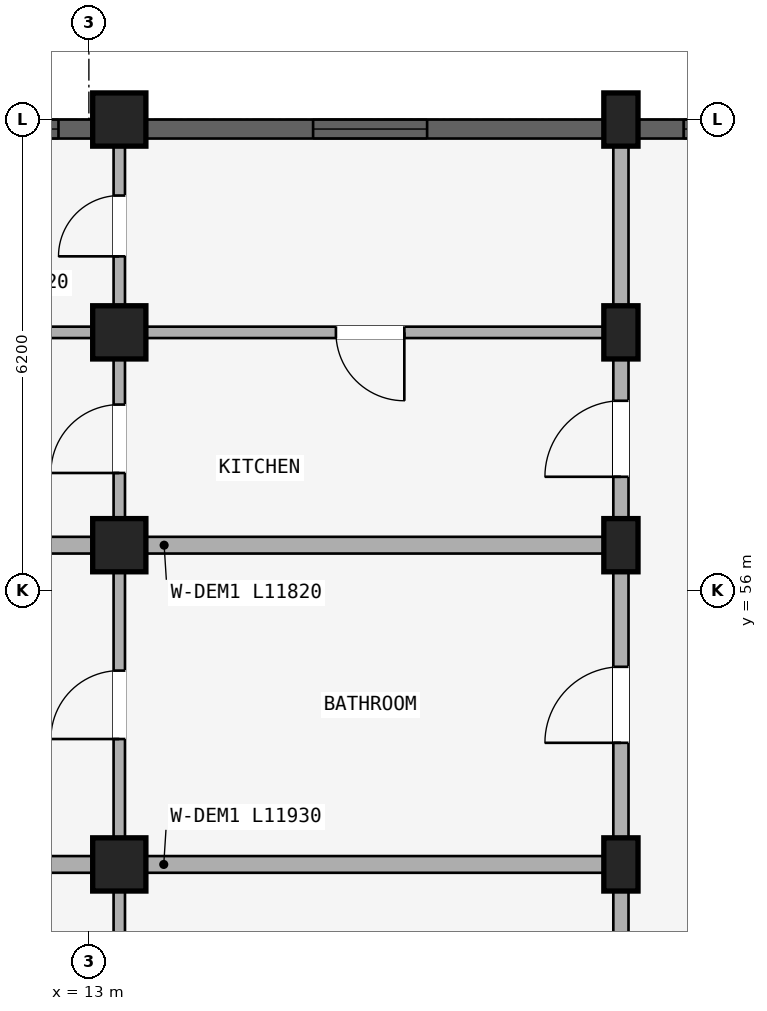
"""IFC4 building model, lengths in metres.
Left out: names, types, materials, properties, quantities, classifications, styles, units other than length and angle.
Written with IfcOpenShell. Run it as: python <this file> out.ifc"""

import sys

from ifc_helpers import new_model, si_unit, direction, frame, frame_2d, origin, origin_2d, place, context, subcontext, project, spatial, rectangle, extrude, element, fill, save


model = new_model("IFC4")
c1 = context("Model", 3, precision=1e-05, world=origin(), true_north=direction((0.0, 1.0)))
c2 = subcontext(c1, "Body", "Model", "MODEL_VIEW")
j1 = project(units=[si_unit("LENGTHUNIT", "METRE"), si_unit("PLANEANGLEUNIT", "RADIAN")], contexts=[c1])
p1 = place(None, origin())
s1 = spatial("IfcSite", under=j1, at=p1, CompositionType="ELEMENT")
p2 = place(p1, origin())
s2 = spatial("IfcBuilding", under=s1, at=p2, CompositionType="ELEMENT")
p3 = place(p2, frame((0.0, 0.0, 24.45)))
s3 = spatial("IfcBuildingStorey", under=s2, at=p3, CompositionType="ELEMENT", Elevation=24.45)
p4 = place(p3, frame((20.0, 52.4, 0.0), z_axis=(0.0, 0.0, 1.0), x_axis=(1.0, 0.0, 0.0)))
e1 = element("IfcColumn", 1, at=p4, inside=s3, PredefinedType="COLUMN", context=c2, shape_type="SweptSolid", body=[
    extrude(rectangle(XDim=0.45, YDim=0.7, at=origin_2d()), origin(), (0.0, 0.0, 1.0), 2.93),
])
p5 = place(p3, frame((13.4, 52.4, 0.0), z_axis=(0.0, 0.0, 1.0), x_axis=(1.0, 0.0, 0.0)))
e2 = element("IfcColumn", 2, at=p5, inside=s3, PredefinedType="COLUMN", context=c2, shape_type="SweptSolid", body=[
    extrude(rectangle(XDim=0.7, YDim=0.7, at=origin_2d()), origin(), (0.0, 0.0, 1.0), 2.93),
])
p6 = place(p3, frame((20.0, 56.6, 0.0), z_axis=(0.0, 0.0, 1.0), x_axis=(1.0, 0.0, 0.0)))
e3 = element("IfcColumn", 3, at=p6, inside=s3, PredefinedType="COLUMN", context=c2, shape_type="SweptSolid", body=[
    extrude(rectangle(XDim=0.45, YDim=0.7, at=origin_2d()), origin(), (0.0, 0.0, 1.0), 2.93),
])
p7 = place(p3, frame((13.4, 56.6, 0.0), z_axis=(0.0, 0.0, 1.0), x_axis=(1.0, 0.0, 0.0)))
e4 = element("IfcColumn", 4, at=p7, inside=s3, PredefinedType="COLUMN", context=c2, shape_type="SweptSolid", body=[
    extrude(rectangle(XDim=0.7, YDim=0.7, at=origin_2d()), origin(), (0.0, 0.0, 1.0), 2.93),
])
p8 = place(p3, frame((20.0, 59.4, 0.0), z_axis=(0.0, 0.0, 1.0), x_axis=(1.0, 0.0, 0.0)))
e5 = element("IfcColumn", 5, at=p8, inside=s3, PredefinedType="COLUMN", context=c2, shape_type="SweptSolid", body=[
    extrude(rectangle(XDim=0.45, YDim=0.7, at=origin_2d()), origin(), (0.0, 0.0, 1.0), 2.93),
])
p9 = place(p3, frame((13.4, 59.4, 0.0), z_axis=(0.0, 0.0, 1.0), x_axis=(1.0, 0.0, 0.0)))
e6 = element("IfcColumn", 6, at=p9, inside=s3, PredefinedType="COLUMN", context=c2, shape_type="SweptSolid", body=[
    extrude(rectangle(XDim=0.7, YDim=0.7, at=origin_2d()), origin(), (0.0, 0.0, 1.0), 2.93),
])
p10 = place(p3, frame((20.0, 62.2, 0.0), z_axis=(0.0, 0.0, 1.0), x_axis=(1.0, 0.0, 0.0)))
e7 = element("IfcColumn", 7, at=p10, inside=s3, PredefinedType="COLUMN", context=c2, shape_type="SweptSolid", body=[
    extrude(rectangle(XDim=0.45, YDim=0.7, at=origin_2d()), origin(), (0.0, 0.0, 1.0), 2.93),
])
p11 = place(p3, frame((13.4, 62.2, 0.0), z_axis=(0.0, 0.0, 1.0), x_axis=(1.0, 0.0, 0.0)))
e8 = element("IfcColumn", 8, at=p11, inside=s3, PredefinedType="COLUMN", context=c2, shape_type="SweptSolid", body=[
    extrude(rectangle(XDim=0.7, YDim=0.7, at=origin_2d()), origin(), (0.0, 0.0, 1.0), 2.93),
])
p12 = place(p3, frame((20.0, 48.35, 0.0), z_axis=(0.0, 0.0, 1.0), x_axis=(0.0, 1.0, 0.0)))
e9 = element("IfcWall", 9, at=p12, inside=s3, PredefinedType="STANDARD", context=c2, shape_type="SweptSolid", body=[
    extrude(rectangle(XDim=4.05, YDim=0.2, at=frame_2d((2.025, 0.0))), origin(), (0.0, 0.0, 1.0), 2.372),
])
p13 = place(p12, frame((1.525, 0.0, 0.0)))
e10 = element("IfcOpeningElement", 10, at=p13, cuts=e9, PredefinedType="OPENING", context=c2, shape_type="SweptSolid", body=[
    extrude(rectangle(XDim=1.0, YDim=2.15, at=frame_2d((0.5, 1.075))), frame((0.0, 0.11, 0.0), z_axis=(0.0, -1.0, 0.0), x_axis=(1.0, 0.0, 0.0)), (0.0, 0.0, 1.0), 0.22),
])
p14 = place(p3, frame((13.4, 48.43, 0.0), z_axis=(0.0, 0.0, 1.0), x_axis=(0.0, 1.0, 0.0)))
e11 = element("IfcWall", 11, at=p14, inside=s3, PredefinedType="PARTITIONING", context=c2, shape_type="SweptSolid", body=[
    extrude(rectangle(XDim=3.89, YDim=0.15, at=frame_2d((1.945, 0.0))), origin(), (0.0, 0.0, 1.0), 2.372),
])
p15 = place(p14, frame((1.495, 0.0, 0.0)))
e12 = element("IfcOpeningElement", 12, at=p15, cuts=e11, PredefinedType="OPENING", context=c2, shape_type="SweptSolid", body=[
    extrude(rectangle(XDim=0.9, YDim=2.1, at=frame_2d((0.45, 1.05))), frame((0.0, 0.085, 0.0), z_axis=(0.0, -1.0, 0.0), x_axis=(1.0, 0.0, 0.0)), (0.0, 0.0, 1.0), 0.17),
])
p16 = place(p3, frame((20.0, 52.4, 0.0), z_axis=(0.0, 0.0, 1.0), x_axis=(0.0, 1.0, 0.0)))
e13 = element("IfcWall", 13, at=p16, inside=s3, PredefinedType="STANDARD", context=c2, shape_type="SweptSolid", body=[
    extrude(rectangle(XDim=4.2, YDim=0.2, at=frame_2d((2.1, 0.0))), origin(), (0.0, 0.0, 1.0), 2.372),
])
p17 = place(p16, frame((1.6, 0.0, 0.0)))
e14 = element("IfcOpeningElement", 14, at=p17, cuts=e13, PredefinedType="OPENING", context=c2, shape_type="SweptSolid", body=[
    extrude(rectangle(XDim=1.0, YDim=2.15, at=frame_2d((0.5, 1.075))), frame((0.0, 0.11, 0.0), z_axis=(0.0, -1.0, 0.0), x_axis=(1.0, 0.0, 0.0)), (0.0, 0.0, 1.0), 0.22),
])
p18 = place(p3, frame((13.4, 52.48, 0.0), z_axis=(0.0, 0.0, 1.0), x_axis=(0.0, 1.0, 0.0)))
e15 = element("IfcWall", 15, at=p18, inside=s3, PredefinedType="PARTITIONING", context=c2, shape_type="SweptSolid", body=[
    extrude(rectangle(XDim=4.04, YDim=0.15, at=frame_2d((2.02, 0.0))), origin(), (0.0, 0.0, 1.0), 2.372),
])
p19 = place(p18, frame((1.57, 0.0, 0.0)))
e16 = element("IfcOpeningElement", 16, at=p19, cuts=e15, PredefinedType="OPENING", context=c2, shape_type="SweptSolid", body=[
    extrude(rectangle(XDim=0.9, YDim=2.1, at=frame_2d((0.45, 1.05))), frame((0.0, 0.085, 0.0), z_axis=(0.0, -1.0, 0.0), x_axis=(1.0, 0.0, 0.0)), (0.0, 0.0, 1.0), 0.17),
])
p20 = place(p3, frame((19.95, 52.4, 0.0), z_axis=(0.0, 0.0, 1.0), x_axis=(-1.0, 0.0, 0.0)))
e17 = element("IfcWall", 17, at=p20, inside=s3, PredefinedType="STANDARD", context=c2, shape_type="SweptSolid", body=[
    extrude(rectangle(XDim=11.93, YDim=0.22, at=frame_2d((5.965, 0.0))), origin(), (0.0, 0.0, 1.0), 2.372),
])
p21 = place(p3, frame((20.0, 56.6, 0.0), z_axis=(0.0, 0.0, 1.0), x_axis=(0.0, 1.0, 0.0)))
e18 = element("IfcWall", 18, at=p21, inside=s3, PredefinedType="STANDARD", context=c2, shape_type="SweptSolid", body=[
    extrude(rectangle(XDim=2.8, YDim=0.2, at=frame_2d((1.4, 0.0))), origin(), (0.0, 0.0, 1.0), 2.372),
])
p22 = place(p21, frame((0.9, 0.0, 0.0)))
e19 = element("IfcOpeningElement", 19, at=p22, cuts=e18, PredefinedType="OPENING", context=c2, shape_type="SweptSolid", body=[
    extrude(rectangle(XDim=1.0, YDim=2.15, at=frame_2d((0.5, 1.075))), frame((0.0, 0.11, 0.0), z_axis=(0.0, -1.0, 0.0), x_axis=(1.0, 0.0, 0.0)), (0.0, 0.0, 1.0), 0.22),
])
p23 = place(p3, frame((13.4, 56.68, 0.0), z_axis=(0.0, 0.0, 1.0), x_axis=(0.0, 1.0, 0.0)))
e20 = element("IfcWall", 20, at=p23, inside=s3, PredefinedType="PLUMBINGWALL", context=c2, shape_type="SweptSolid", body=[
    extrude(rectangle(XDim=2.64, YDim=0.15, at=frame_2d((1.32, 0.0))), origin(), (0.0, 0.0, 1.0), 2.372),
])
p24 = place(p23, frame((0.87, 0.0, 0.0)))
e21 = element("IfcOpeningElement", 21, at=p24, cuts=e20, PredefinedType="OPENING", context=c2, shape_type="SweptSolid", body=[
    extrude(rectangle(XDim=0.9, YDim=2.1, at=frame_2d((0.45, 1.05))), frame((0.0, 0.085, 0.0), z_axis=(0.0, -1.0, 0.0), x_axis=(1.0, 0.0, 0.0)), (0.0, 0.0, 1.0), 0.17),
])
p25 = place(p3, frame((19.9, 56.6, 0.0), z_axis=(0.0, 0.0, 1.0), x_axis=(-1.0, 0.0, 0.0)))
e22 = element("IfcWall", 22, at=p25, inside=s3, PredefinedType="STANDARD", context=c2, shape_type="SweptSolid", body=[
    extrude(rectangle(XDim=11.82, YDim=0.22, at=frame_2d((5.91, 0.0))), origin(), (0.0, 0.0, 1.0), 2.372),
])
p26 = place(p3, frame((20.0, 59.4, 0.0), z_axis=(0.0, 0.0, 1.0), x_axis=(0.0, 1.0, 0.0)))
e23 = element("IfcWall", 23, at=p26, inside=s3, PredefinedType="STANDARD", context=c2, shape_type="SweptSolid", body=[
    extrude(rectangle(XDim=2.8, YDim=0.2, at=frame_2d((1.4, 0.0))), origin(), (0.0, 0.0, 1.0), 2.372),
])
p27 = place(p3, frame((13.4, 59.48, 0.0), z_axis=(0.0, 0.0, 1.0), x_axis=(0.0, 1.0, 0.0)))
e24 = element("IfcWall", 24, at=p27, inside=s3, PredefinedType="PLUMBINGWALL", context=c2, shape_type="SweptSolid", body=[
    extrude(rectangle(XDim=2.64, YDim=0.15, at=frame_2d((1.32, 0.0))), origin(), (0.0, 0.0, 1.0), 2.372),
])
p28 = place(p27, frame((0.92, 0.0, 0.0)))
e25 = element("IfcOpeningElement", 25, at=p28, cuts=e24, PredefinedType="OPENING", context=c2, shape_type="SweptSolid", body=[
    extrude(rectangle(XDim=0.8, YDim=2.1, at=frame_2d((0.4, 1.05))), frame((0.0, 0.085, 0.0), z_axis=(0.0, -1.0, 0.0), x_axis=(1.0, 0.0, 0.0)), (0.0, 0.0, 1.0), 0.17),
])
p29 = place(p3, frame((19.9, 59.4, 0.0), z_axis=(0.0, 0.0, 1.0), x_axis=(-1.0, 0.0, 0.0)))
e26 = element("IfcWall", 26, at=p29, inside=s3, PredefinedType="PARTITIONING", context=c2, shape_type="SweptSolid", body=[
    extrude(rectangle(XDim=11.82, YDim=0.15, at=frame_2d((5.91, 0.0))), origin(), (0.0, 0.0, 1.0), 2.372),
])
p30 = place(p29, frame((2.75, 0.0, 0.0)))
e27 = element("IfcOpeningElement", 27, at=p30, cuts=e26, PredefinedType="OPENING", context=c2, shape_type="SweptSolid", body=[
    extrude(rectangle(XDim=0.9, YDim=2.1, at=frame_2d((0.45, 1.05))), frame((0.0, 0.085, 0.0), z_axis=(0.0, -1.0, 0.0), x_axis=(1.0, 0.0, 0.0)), (0.0, 0.0, 1.0), 0.17),
])
p31 = place(p3, frame((22.171, 62.075, 0.0), z_axis=(0.0, 0.0, 1.0), x_axis=(-1.0, 0.0, 0.0)))
e28 = element("IfcWall", 28, at=p31, inside=s3, PredefinedType="STANDARD", context=c2, shape_type="SweptSolid", body=[
    extrude(rectangle(XDim=1.943, YDim=0.25, at=frame_2d((0.971, 0.0))), origin(), (0.0, 0.0, 1.0), 2.372),
])
p32 = place(p31, frame((0.596, 0.0, 0.88)))
e29 = element("IfcOpeningElement", 29, at=p32, cuts=e28, PredefinedType="OPENING", context=c2, shape_type="SweptSolid", body=[
    extrude(rectangle(XDim=0.75, YDim=1.05, at=frame_2d((0.375, 0.525))), frame((0.0, 0.135, 0.0), z_axis=(0.0, -1.0, 0.0), x_axis=(1.0, 0.0, 0.0)), (0.0, 0.0, 1.0), 0.27),
])
p33 = place(p3, frame((19.771, 62.075, 0.0), z_axis=(0.0, 0.0, 1.0), x_axis=(-1.0, 0.0, 0.0)))
e30 = element("IfcWall", 30, at=p33, inside=s3, PredefinedType="STANDARD", context=c2, shape_type="SweptSolid", body=[
    extrude(rectangle(XDim=6.018, YDim=0.25, at=frame_2d((3.009, 0.0))), origin(), (0.0, 0.0, 1.0), 2.372),
])
p34 = place(p33, frame((2.322, 0.0, 0.522)))
e31 = element("IfcOpeningElement", 31, at=p34, cuts=e30, PredefinedType="OPENING", context=c2, shape_type="SweptSolid", body=[
    extrude(rectangle(XDim=1.5, YDim=1.65, at=frame_2d((0.75, 0.825))), frame((0.0, 0.135, 0.0), z_axis=(0.0, -1.0, 0.0), x_axis=(1.0, 0.0, 0.0)), (0.0, 0.0, 1.0), 0.27),
])
p35 = place(p3, frame((13.046, 62.075, 0.0), z_axis=(0.0, 0.0, 1.0), x_axis=(-1.0, 0.0, 0.0)))
e32 = element("IfcWall", 32, at=p35, inside=s3, PredefinedType="STANDARD", context=c2, shape_type="SweptSolid", body=[
    extrude(rectangle(XDim=2.093, YDim=0.25, at=frame_2d((1.046, 0.0))), origin(), (0.0, 0.0, 1.0), 2.372),
])
p36 = place(p35, frame((0.447, 0.0, 0.672)))
e33 = element("IfcOpeningElement", 33, at=p36, cuts=e32, PredefinedType="OPENING", context=c2, shape_type="SweptSolid", body=[
    extrude(rectangle(XDim=1.2, YDim=1.5, at=frame_2d((0.6, 0.75))), frame((0.0, 0.135, 0.0), z_axis=(0.0, -1.0, 0.0), x_axis=(1.0, 0.0, 0.0)), (0.0, 0.0, 1.0), 0.27),
])
p37 = place(p32, origin())
e34 = element("IfcWindow", 34, at=p37, inside=s3, PartitioningType="SINGLE_PANEL", PredefinedType="WINDOW", context=c2, shape_type="SweptSolid", body=[
    extrude(rectangle(XDim=0.75, YDim=1.05, at=frame_2d((0.375, 0.525))), frame((0.0, 0.03, 0.0), z_axis=(0.0, -1.0, 0.0), x_axis=(1.0, 0.0, 0.0)), (0.0, 0.0, 1.0), 0.06),
])
fill(e29, e34)
p38 = place(p34, origin())
e35 = element("IfcWindow", 35, at=p38, inside=s3, PartitioningType="DOUBLE_PANEL_VERTICAL", PredefinedType="WINDOW", context=c2, shape_type="SweptSolid", body=[
    extrude(rectangle(XDim=1.5, YDim=1.65, at=frame_2d((0.75, 0.825))), frame((0.0, 0.03, 0.0), z_axis=(0.0, -1.0, 0.0), x_axis=(1.0, 0.0, 0.0)), (0.0, 0.0, 1.0), 0.06),
])
fill(e31, e35)
p39 = place(p36, origin())
e36 = element("IfcWindow", 36, at=p39, inside=s3, PartitioningType="SINGLE_PANEL", PredefinedType="WINDOW", context=c2, shape_type="SweptSolid", body=[
    extrude(rectangle(XDim=1.2, YDim=1.5, at=frame_2d((0.6, 0.75))), frame((0.0, 0.03, 0.0), z_axis=(0.0, -1.0, 0.0), x_axis=(1.0, 0.0, 0.0)), (0.0, 0.0, 1.0), 0.06),
])
fill(e33, e36)
p40 = place(p17, origin())
e37 = element("IfcDoor", 37, at=p40, inside=s3, OperationType="SINGLE_SWING_LEFT", PredefinedType="DOOR", context=c2, shape_type="SweptSolid", body=[
    extrude(rectangle(XDim=1.0, YDim=2.15, at=frame_2d((0.5, 1.075))), frame((0.0, 0.025, 0.0), z_axis=(0.0, -1.0, 0.0), x_axis=(1.0, 0.0, 0.0)), (0.0, 0.0, 1.0), 0.05),
])
fill(e14, e37)
p41 = place(p19, frame((0.9, 0.0, 0.0), z_axis=(0.0, 0.0, 1.0), x_axis=(-1.0, 0.0, 0.0)))
e38 = element("IfcDoor", 38, at=p41, inside=s3, OperationType="SINGLE_SWING_RIGHT", PredefinedType="DOOR", context=c2, shape_type="SweptSolid", body=[
    extrude(rectangle(XDim=0.9, YDim=2.1, at=frame_2d((0.45, 1.05))), frame((0.0, 0.025, 0.0), z_axis=(0.0, -1.0, 0.0), x_axis=(1.0, 0.0, 0.0)), (0.0, 0.0, 1.0), 0.05),
])
fill(e16, e38)
p42 = place(p24, frame((0.9, 0.0, 0.0), z_axis=(0.0, 0.0, 1.0), x_axis=(-1.0, 0.0, 0.0)))
e39 = element("IfcDoor", 39, at=p42, inside=s3, OperationType="SINGLE_SWING_RIGHT", PredefinedType="DOOR", context=c2, shape_type="SweptSolid", body=[
    extrude(rectangle(XDim=0.9, YDim=2.1, at=frame_2d((0.45, 1.05))), frame((0.0, 0.025, 0.0), z_axis=(0.0, -1.0, 0.0), x_axis=(1.0, 0.0, 0.0)), (0.0, 0.0, 1.0), 0.05),
])
fill(e21, e39)
p43 = place(p22, origin())
e40 = element("IfcDoor", 40, at=p43, inside=s3, OperationType="SINGLE_SWING_LEFT", PredefinedType="DOOR", context=c2, shape_type="SweptSolid", body=[
    extrude(rectangle(XDim=1.0, YDim=2.15, at=frame_2d((0.5, 1.075))), frame((0.0, 0.025, 0.0), z_axis=(0.0, -1.0, 0.0), x_axis=(1.0, 0.0, 0.0)), (0.0, 0.0, 1.0), 0.05),
])
fill(e19, e40)
p44 = place(p28, frame((0.8, 0.0, 0.0), z_axis=(0.0, 0.0, 1.0), x_axis=(-1.0, 0.0, 0.0)))
e41 = element("IfcDoor", 41, at=p44, inside=s3, OperationType="SINGLE_SWING_RIGHT", PredefinedType="DOOR", context=c2, shape_type="SweptSolid", body=[
    extrude(rectangle(XDim=0.8, YDim=2.1, at=frame_2d((0.4, 1.05))), frame((0.0, 0.025, 0.0), z_axis=(0.0, -1.0, 0.0), x_axis=(1.0, 0.0, 0.0)), (0.0, 0.0, 1.0), 0.05),
])
fill(e25, e41)
p45 = place(p30, frame((0.9, 0.0, 0.0), z_axis=(0.0, 0.0, 1.0), x_axis=(-1.0, 0.0, 0.0)))
e42 = element("IfcDoor", 42, at=p45, inside=s3, OperationType="SINGLE_SWING_RIGHT", PredefinedType="DOOR", context=c2, shape_type="SweptSolid", body=[
    extrude(rectangle(XDim=0.9, YDim=2.1, at=frame_2d((0.45, 1.05))), frame((0.0, 0.025, 0.0), z_axis=(0.0, -1.0, 0.0), x_axis=(1.0, 0.0, 0.0)), (0.0, 0.0, 1.0), 0.05),
])
fill(e27, e42)
save(model, sys.argv[1])
